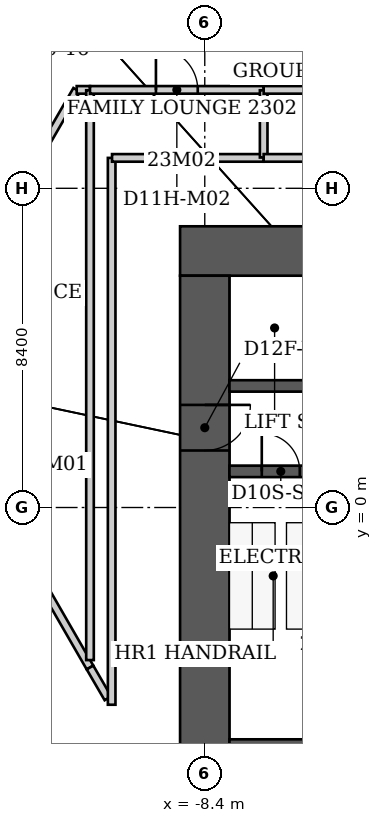
"""IFC4 building model, lengths in metres.
Left out: names, types, materials, properties, quantities, classifications, styles, units other than length and angle.
Written with IfcOpenShell. Run it as: python <this file> out.ifc"""

import sys

from ifc_helpers import new_model, si_unit, direction, frame, frame_2d, origin, place, context, subcontext, project, spatial, rectangle, extrude, element, fill, save


model = new_model("IFC4")
c1 = context("Model", 3, precision=1e-05, world=origin(), true_north=direction((0.0, 1.0)))
c2 = subcontext(c1, "Body", "Model", "MODEL_VIEW")
j1 = project(units=[si_unit("LENGTHUNIT", "METRE"), si_unit("PLANEANGLEUNIT", "RADIAN")], contexts=[c1])
p1 = place(None, origin())
s1 = spatial("IfcSite", under=j1, at=p1, CompositionType="ELEMENT")
p2 = place(p1, origin())
s2 = spatial("IfcBuilding", under=s1, at=p2, CompositionType="ELEMENT")
p3 = place(p2, frame((0.0, 0.0, 96.8)))
s3 = spatial("IfcBuildingStorey", under=s2, at=p3, CompositionType="ELEMENT", Elevation=96.8)
p4 = place(p3, frame((-9.05, 6.75, 0.0), z_axis=(0.0, 0.0, 1.0), x_axis=(1.0, 0.0, 0.0)))
e1 = element("IfcWall", 1, at=p4, inside=s3, PredefinedType="SHEAR", context=c2, shape_type="SweptSolid", body=[
    extrude(rectangle(XDim=18.1, YDim=1.3, at=frame_2d((9.05, 0.0))), origin(), (0.0, 0.0, 1.0), 3.8),
])
p5 = place(p3, frame((-8.4, -9.2, 0.0), z_axis=(0.0, 0.0, 1.0), x_axis=(0.0, 1.0, 0.0)))
e2 = element("IfcWall", 2, at=p5, inside=s3, PredefinedType="SHEAR", context=c2, shape_type="SweptSolid", body=[
    extrude(rectangle(XDim=15.3, YDim=1.3, at=frame_2d((7.65, 0.0))), origin(), (0.0, 0.0, 1.0), 3.8),
])
p6 = place(p5, frame((10.7, 0.0, 0.0)))
e3 = element("IfcOpeningElement", 3, at=p6, cuts=e2, PredefinedType="OPENING", context=c2, shape_type="SweptSolid", body=[
    extrude(rectangle(XDim=1.2, YDim=2.2, at=frame_2d((0.6, 1.1))), frame((0.0, 0.65, 0.0), z_axis=(0.0, -1.0, 0.0), x_axis=(1.0, 0.0, 0.0)), (0.0, 0.0, 1.0), 1.3),
])
p7 = place(p3, frame((-7.75, -6.5, 0.0), z_axis=(0.0, 0.0, 1.0), x_axis=(1.0, 0.0, 0.0)))
e4 = element("IfcWall", 4, at=p7, inside=s3, PredefinedType="SHEAR", context=c2, shape_type="SweptSolid", body=[
    extrude(rectangle(XDim=15.5, YDim=0.8, at=frame_2d((7.75, 0.0))), origin(), (0.0, 0.0, 1.0), 3.8),
])
p8 = place(p3, frame((-7.75, 0.95, 0.0), z_axis=(0.0, 0.0, 1.0), x_axis=(1.0, 0.0, 0.0)))
e5 = element("IfcWall", 5, at=p8, inside=s3, PredefinedType="SHEAR", context=c2, shape_type="SweptSolid", body=[
    extrude(rectangle(XDim=3.0, YDim=0.3, at=frame_2d((1.5, 0.0))), origin(), (0.0, 0.0, 1.0), 3.8),
])
p9 = place(p8, frame((0.85, 0.0, 0.0)))
e6 = element("IfcOpeningElement", 6, at=p9, cuts=e5, PredefinedType="OPENING", context=c2, shape_type="SweptSolid", body=[
    extrude(rectangle(XDim=1.0, YDim=2.2, at=frame_2d((0.5, 1.1))), frame((0.0, 0.15, 0.0), z_axis=(0.0, -1.0, 0.0), x_axis=(1.0, 0.0, 0.0)), (0.0, 0.0, 1.0), 0.3),
])
p10 = place(p3, frame((-7.75, 3.2, 0.0), z_axis=(0.0, 0.0, 1.0), x_axis=(1.0, 0.0, 0.0)))
e7 = element("IfcWall", 7, at=p10, inside=s3, PredefinedType="SHEAR", context=c2, shape_type="SweptSolid", body=[
    extrude(rectangle(XDim=15.5, YDim=0.3, at=frame_2d((7.75, 0.0))), origin(), (0.0, 0.0, 1.0), 3.8),
])
p11 = place(p10, frame((9.825, 0.0, 0.0)))
e8 = element("IfcOpeningElement", 8, at=p11, cuts=e7, PredefinedType="OPENING", context=c2, shape_type="SweptSolid", body=[
    extrude(rectangle(XDim=1.1, YDim=2.2, at=frame_2d((0.55, 1.1))), frame((0.0, 0.15, 0.0), z_axis=(0.0, -1.0, 0.0), x_axis=(1.0, 0.0, 0.0)), (0.0, 0.0, 1.0), 0.3),
])
p12 = place(p3, frame((-30.775, 5.038, 0.0), z_axis=(0.0, 0.0, 1.0), x_axis=(0.499999235055, -0.866025845425, 0.0)))
e9 = element("IfcWall", 9, at=p12, inside=s3, PredefinedType="PARAPET", context=c2, shape_type="SweptSolid", body=[
    extrude(rectangle(XDim=39.5, YDim=0.25, at=frame_2d((19.75, 0.0))), origin(), (0.0, 0.0, 1.0), 1.1),
])
p13 = place(p3, frame((-15.98, 3.7, 0.0), z_axis=(0.0, 0.0, 1.0), x_axis=(0.500093981358, 0.865971136822, 0.0)))
e10 = element("IfcWall", 10, at=p13, inside=s3, PredefinedType="PARTITIONING", context=c2, shape_type="SweptSolid", body=[
    extrude(rectangle(XDim=8.418, YDim=0.2, at=frame_2d((4.209, 0.0))), origin(), (0.0, 0.0, 1.0), 3.64),
])
p14 = place(p3, frame((-14.32, -3.98, 0.0), z_axis=(0.0, 0.0, 1.0), x_axis=(0.499495696009, -0.866316368118, 0.0)))
e11 = element("IfcWall", 11, at=p14, inside=s3, PredefinedType="PARTITIONING", context=c2, shape_type="SweptSolid", body=[
    extrude(rectangle(XDim=8.669, YDim=0.2, at=frame_2d((4.334, 0.0))), origin(), (0.0, 0.0, 1.0), 3.64),
])
p15 = place(p14, frame((3.834, 0.0, 0.0)))
e12 = element("IfcOpeningElement", 12, at=p15, cuts=e11, PredefinedType="OPENING", context=c2, shape_type="SweptSolid", body=[
    extrude(rectangle(XDim=1.0, YDim=2.13, at=frame_2d((0.5, 1.065))), frame((0.0, 0.1, 0.0), z_axis=(0.0, -1.0, 0.0), x_axis=(1.0, 0.0, 0.0)), (0.0, 0.0, 1.0), 0.2),
])
p16 = place(p3, frame((-11.77, 10.99, 0.0), z_axis=(0.0, 0.0, 1.0), x_axis=(1.0, 0.0, 0.0)))
e13 = element("IfcWall", 13, at=p16, inside=s3, PredefinedType="PARTITIONING", context=c2, shape_type="SweptSolid", body=[
    extrude(rectangle(XDim=0.35, YDim=0.2, at=frame_2d((0.175, 0.0))), origin(), (0.0, 0.0, 1.0), 3.64),
])
p17 = place(p3, frame((-11.42, -4.21, 0.0), z_axis=(0.0, 0.0, 1.0), x_axis=(-0.499446957289, 0.866344467781, 0.0)))
e14 = element("IfcWall", 14, at=p17, inside=s3, PredefinedType="PARTITIONING", context=c2, shape_type="SweptSolid", body=[
    extrude(rectangle(XDim=9.13, YDim=0.2, at=frame_2d((4.565, 0.0))), origin(), (0.0, 0.0, 1.0), 3.64),
])
p18 = place(p17, frame((4.015, 0.0, 0.0)))
e15 = element("IfcOpeningElement", 15, at=p18, cuts=e14, PredefinedType="OPENING", context=c2, shape_type="SweptSolid", body=[
    extrude(rectangle(XDim=1.1, YDim=2.2, at=frame_2d((0.55, 1.1))), frame((0.0, 0.1, 0.0), z_axis=(0.0, -1.0, 0.0), x_axis=(1.0, 0.0, 0.0)), (0.0, 0.0, 1.0), 0.2),
])
p19 = place(p3, frame((-11.42, 10.98, 0.0), z_axis=(0.0, 0.0, 1.0), x_axis=(0.0, -1.0, 0.0)))
e16 = element("IfcWall", 16, at=p19, inside=s3, PredefinedType="PARTITIONING", context=c2, shape_type="SweptSolid", body=[
    extrude(rectangle(XDim=14.995, YDim=0.2, at=frame_2d((7.498, 0.0))), origin(), (0.0, 0.0, 1.0), 3.64),
])
p20 = place(p3, frame((-11.42, 10.99, 0.0), z_axis=(0.0, 0.0, 1.0), x_axis=(1.0, 0.0, 0.0)))
e17 = element("IfcWall", 17, at=p20, inside=s3, PredefinedType="PARTITIONING", context=c2, shape_type="SweptSolid", body=[
    extrude(rectangle(XDim=4.57, YDim=0.2, at=frame_2d((2.285, 0.0))), origin(), (0.0, 0.0, 1.0), 3.64),
])
p21 = place(p20, frame((1.735, 0.0, 0.0)))
e18 = element("IfcOpeningElement", 18, at=p21, cuts=e17, PredefinedType="OPENING", context=c2, shape_type="SweptSolid", body=[
    extrude(rectangle(XDim=1.1, YDim=2.2, at=frame_2d((0.55, 1.1))), frame((0.0, 0.1, 0.0), z_axis=(0.0, -1.0, 0.0), x_axis=(1.0, 0.0, 0.0)), (0.0, 0.0, 1.0), 0.2),
])
p22 = place(p3, frame((-10.948, -5.021, 0.0), z_axis=(0.0, 0.0, 1.0), x_axis=(-0.502706337432, 0.86445725071, 0.0)))
e19 = element("IfcWall", 19, at=p22, inside=s3, PredefinedType="PARTITIONING", context=c2, shape_type="SweptSolid", body=[
    extrude(rectangle(XDim=0.939, YDim=0.2, at=frame_2d((0.469, 0.0))), origin(), (0.0, 0.0, 1.0), 3.64),
])
p23 = place(p3, frame((-10.85, 9.2, 0.0), z_axis=(0.0, 0.0, 1.0), x_axis=(0.0, -1.0, 0.0)))
e20 = element("IfcWall", 20, at=p23, inside=s3, PredefinedType="PARTITIONING", context=c2, shape_type="SweptSolid", body=[
    extrude(rectangle(XDim=14.39, YDim=0.2, at=frame_2d((7.195, 0.0))), origin(), (0.0, 0.0, 1.0), 3.64),
])
p24 = place(p3, frame((-6.85, 9.2, 0.0), z_axis=(0.0, 0.0, 1.0), x_axis=(-1.0, 0.0, 0.0)))
e21 = element("IfcWall", 21, at=p24, inside=s3, PredefinedType="PARTITIONING", context=c2, shape_type="SweptSolid", body=[
    extrude(rectangle(XDim=3.99, YDim=0.2, at=frame_2d((1.995, 0.0))), origin(), (0.0, 0.0, 1.0), 3.64),
])
p25 = place(p3, frame((-6.85, 10.98, 0.0), z_axis=(0.0, 0.0, 1.0), x_axis=(0.0, -1.0, 0.0)))
e22 = element("IfcWall", 22, at=p25, inside=s3, PredefinedType="PARTITIONING", context=c2, shape_type="SweptSolid", body=[
    extrude(rectangle(XDim=1.77, YDim=0.2, at=frame_2d((0.885, 0.0))), origin(), (0.0, 0.0, 1.0), 3.64),
])
p26 = place(p3, frame((-6.85, 10.99, 0.0), z_axis=(0.0, 0.0, 1.0), x_axis=(1.0, 0.0, 0.0)))
e23 = element("IfcWall", 23, at=p26, inside=s3, PredefinedType="PARTITIONING", context=c2, shape_type="SweptSolid", body=[
    extrude(rectangle(XDim=4.57, YDim=0.2, at=frame_2d((2.285, 0.0))), origin(), (0.0, 0.0, 1.0), 3.64),
])
p27 = place(p26, frame((1.735, 0.0, 0.0)))
e24 = element("IfcOpeningElement", 24, at=p27, cuts=e23, PredefinedType="OPENING", context=c2, shape_type="SweptSolid", body=[
    extrude(rectangle(XDim=1.1, YDim=2.2, at=frame_2d((0.55, 1.1))), frame((0.0, 0.1, 0.0), z_axis=(0.0, -1.0, 0.0), x_axis=(1.0, 0.0, 0.0)), (0.0, 0.0, 1.0), 0.2),
])
p28 = place(p3, frame((-2.28, 9.2, 0.0), z_axis=(0.0, 0.0, 1.0), x_axis=(-1.0, 0.0, 0.0)))
e25 = element("IfcWall", 25, at=p28, inside=s3, PredefinedType="PARTITIONING", context=c2, shape_type="SweptSolid", body=[
    extrude(rectangle(XDim=4.57, YDim=0.2, at=frame_2d((2.285, 0.0))), origin(), (0.0, 0.0, 1.0), 3.64),
])
p29 = place(p21, origin())
e26 = element("IfcDoor", 26, at=p29, inside=s3, OperationType="SINGLE_SWING_LEFT", PredefinedType="DOOR", context=c2, shape_type="SweptSolid", body=[
    extrude(rectangle(XDim=1.1, YDim=2.2, at=frame_2d((0.55, 1.1))), frame((0.0, 0.025, 0.0), z_axis=(0.0, -1.0, 0.0), x_axis=(1.0, 0.0, 0.0)), (0.0, 0.0, 1.0), 0.05),
])
fill(e18, e26)
p30 = place(p9, origin())
e27 = element("IfcDoor", 27, at=p30, inside=s3, OperationType="SINGLE_SWING_LEFT", PredefinedType="DOOR", context=c2, shape_type="SweptSolid", body=[
    extrude(rectangle(XDim=1.0, YDim=2.2, at=frame_2d((0.5, 1.1))), frame((0.0, 0.025, 0.0), z_axis=(0.0, -1.0, 0.0), x_axis=(1.0, 0.0, 0.0)), (0.0, 0.0, 1.0), 0.05),
])
fill(e6, e27)
p31 = place(p6, origin())
e28 = element("IfcDoor", 28, at=p31, inside=s3, OperationType="SINGLE_SWING_RIGHT", PredefinedType="DOOR", context=c2, shape_type="SweptSolid", body=[
    extrude(rectangle(XDim=1.2, YDim=2.2, at=frame_2d((0.6, 1.1))), frame((0.0, 0.025, 0.0), z_axis=(0.0, -1.0, 0.0), x_axis=(1.0, 0.0, 0.0)), (0.0, 0.0, 1.0), 0.05),
])
fill(e3, e28)
save(model, sys.argv[1])
